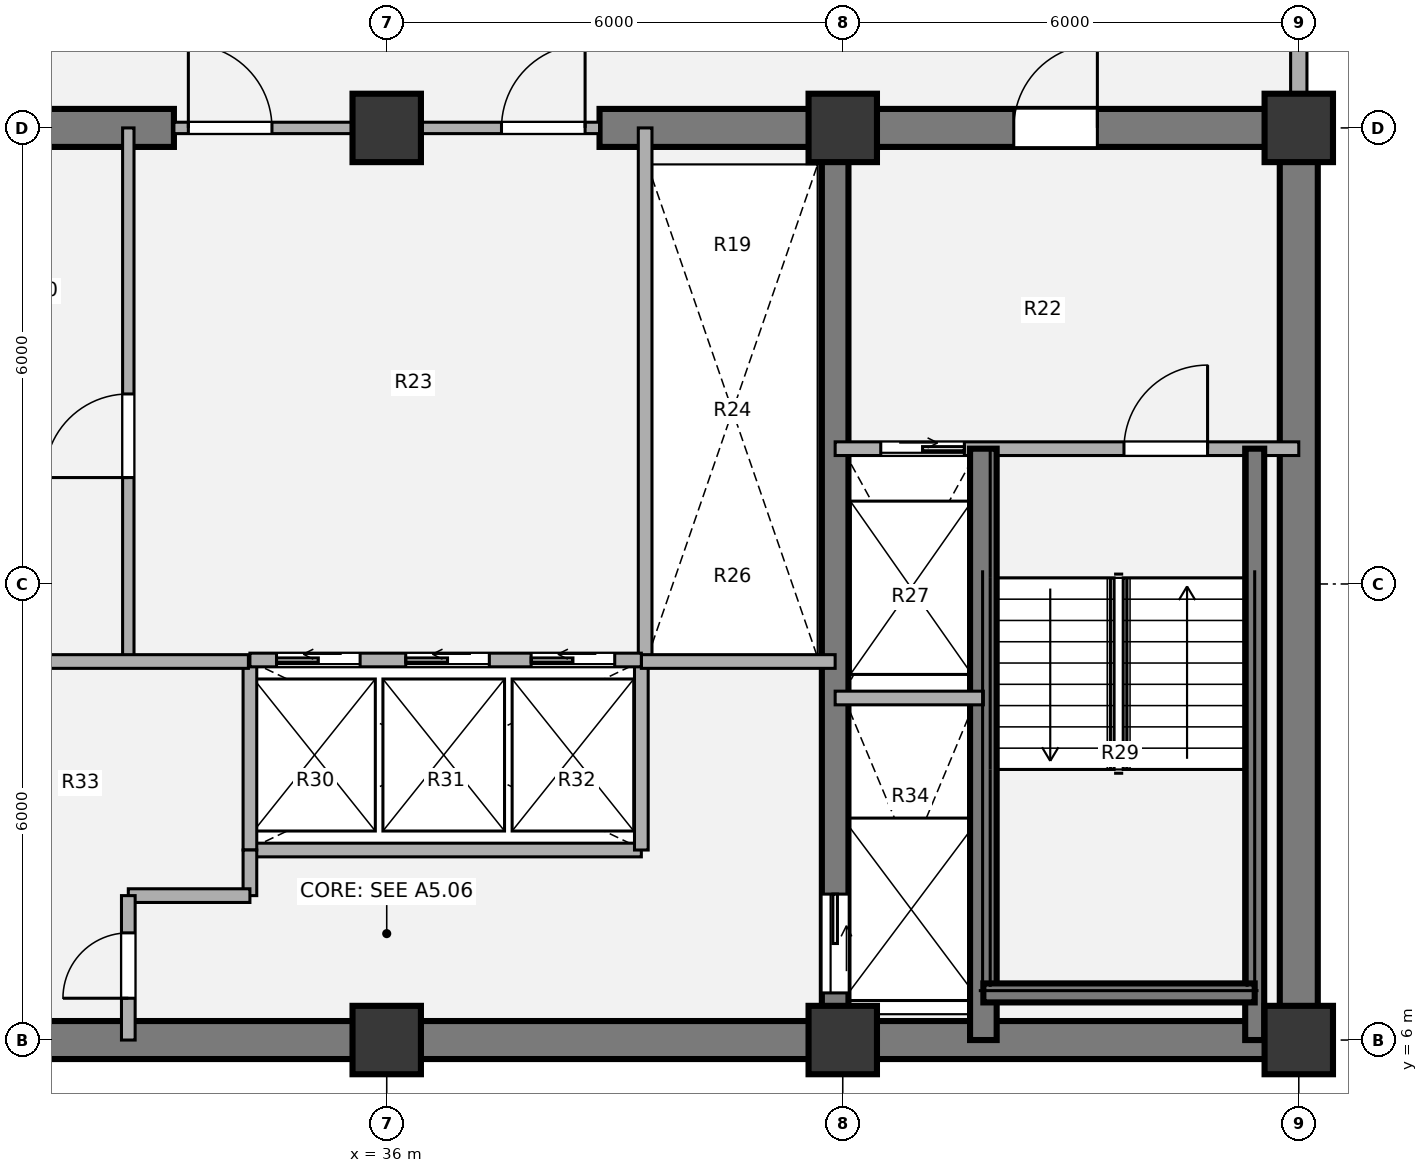
"""IFC4 building model, lengths in metres.
Left out: names, types, materials, properties, quantities, classifications, styles, units other than length and angle.
Written with IfcOpenShell. Run it as: python <this file> out.ifc"""

import sys

from ifc_helpers import new_model, si_unit, direction, frame, frame_2d, origin, origin_2d, place, context, subcontext, project, spatial, rectangle, extrude, source, transform, mapped, element, fill, save


model = new_model("IFC4")
c1 = context("Model", 3, precision=1e-05, world=origin(), true_north=direction((0.0, 1.0)))
c2 = subcontext(c1, "Body", "Model", "MODEL_VIEW")
j1 = project(units=[si_unit("LENGTHUNIT", "METRE"), si_unit("PLANEANGLEUNIT", "RADIAN")], contexts=[c1])
p1 = place(None, origin())
s1 = spatial("IfcSite", under=j1, at=p1, CompositionType="ELEMENT")
p2 = place(p1, origin())
s2 = spatial("IfcBuilding", under=s1, at=p2, CompositionType="ELEMENT")
p3 = place(p2, frame((0.0, 0.0, 104.94)))
s3 = spatial("IfcBuildingStorey", under=s2, at=p3, CompositionType="ELEMENT", Elevation=104.94)
m1 = source(origin(), c2, "Body", "SweptSolid", [
    extrude(rectangle(XDim=0.9, YDim=0.9, at=origin_2d()), origin(), (0.0, 0.0, 1.0), 3.78),
])
for number, where, z_axis, x_axis in (
    (1, (36.0, 6.0, 0.0), (0.0, 0.0, 1.0), (1.0, 0.0, 0.0)),
    (2, (42.0, 6.0, 0.0), (0.0, 0.0, 1.0), (1.0, 0.0, 0.0)),
    (3, (48.0, 6.0, 0.0), (0.0, 0.0, 1.0), (1.0, 0.0, 0.0)),
    (4, (36.0, 18.0, 0.0), (0.0, 0.0, 1.0), (1.0, 0.0, 0.0)),
    (5, (42.0, 18.0, 0.0), (0.0, 0.0, 1.0), (1.0, 0.0, 0.0)),
    (6, (48.0, 18.0, 0.0), (0.0, 0.0, 1.0), (1.0, 0.0, 0.0)),
):
    element("IfcColumn", number, at=place(p3, frame(where, z_axis=z_axis, x_axis=x_axis)), inside=s3, PredefinedType="COLUMN", context=c2, shape_type="MappedRepresentation", body=[
        mapped(m1, transform((0.0, 0.0, 0.0), x_axis=(1.0, 0.0, 0.0), y_axis=(0.0, 1.0, 0.0), z_axis=(0.0, 0.0, 1.0), scale=1.0)),
    ])
p4 = place(p3, frame((48.25, 6.0, 0.0), z_axis=(0.0, 0.0, 1.0), x_axis=(-1.0, 0.0, 0.0)))
e7 = element("IfcWall", 7, at=p4, inside=s3, PredefinedType="SHEAR", context=c2, shape_type="SweptSolid", body=[
    extrude(rectangle(XDim=24.5, YDim=0.5, at=frame_2d((12.25, 0.0))), origin(), (0.0, 0.0, 1.0), 3.78),
])
p5 = place(p3, frame((48.0, 18.0, 0.0), z_axis=(0.0, 0.0, 1.0), x_axis=(0.0, -1.0, 0.0)))
e8 = element("IfcWall", 8, at=p5, inside=s3, PredefinedType="SHEAR", context=c2, shape_type="SweptSolid", body=[
    extrude(rectangle(XDim=12.0, YDim=0.5, at=frame_2d((6.0, 0.0))), origin(), (0.0, 0.0, 1.0), 3.78),
])
p6 = place(p3, frame((23.75, 18.0, 0.0), z_axis=(0.0, 0.0, 1.0), x_axis=(1.0, 0.0, 0.0)))
e9 = element("IfcWall", 9, at=p6, inside=s3, PredefinedType="SHEAR", context=c2, shape_type="SweptSolid", body=[
    extrude(rectangle(XDim=9.45, YDim=0.5, at=frame_2d((4.725, 0.0))), origin(), (0.0, 0.0, 1.0), 3.78),
])
p7 = place(p6, frame((2.95, 0.0, 0.0)))
e10 = element("IfcOpeningElement", 10, at=p7, cuts=e9, PredefinedType="OPENING", context=c2, shape_type="SweptSolid", body=[
    extrude(rectangle(XDim=1.1, YDim=2.1, at=origin_2d()), frame((0.55, 0.26, 1.05), z_axis=(0.0, -1.0, 0.0), x_axis=(1.0, 0.0, 0.0)), (0.0, 0.0, 1.0), 0.52),
])
p8 = place(p3, frame((38.8, 18.0, 0.0), z_axis=(0.0, 0.0, 1.0), x_axis=(1.0, 0.0, 0.0)))
e11 = element("IfcWall", 11, at=p8, inside=s3, PredefinedType="SHEAR", context=c2, shape_type="SweptSolid", body=[
    extrude(rectangle(XDim=9.45, YDim=0.5, at=frame_2d((4.725, 0.0))), origin(), (0.0, 0.0, 1.0), 3.78),
])
p9 = place(p8, frame((5.45, 0.0, 0.0)))
e12 = element("IfcOpeningElement", 12, at=p9, cuts=e11, PredefinedType="OPENING", context=c2, shape_type="SweptSolid", body=[
    extrude(rectangle(XDim=1.1, YDim=2.1, at=origin_2d()), frame((0.55, 0.26, 1.05), z_axis=(0.0, -1.0, 0.0), x_axis=(1.0, 0.0, 0.0)), (0.0, 0.0, 1.0), 0.52),
])
p10 = place(p3, frame((41.9, 18.0, 0.0), z_axis=(0.0, 0.0, 1.0), x_axis=(0.0, -1.0, 0.0)))
e13 = element("IfcWall", 13, at=p10, inside=s3, PredefinedType="SHEAR", context=c2, shape_type="SweptSolid", body=[
    extrude(rectangle(XDim=12.0, YDim=0.35, at=frame_2d((6.0, 0.0))), origin(), (0.0, 0.0, 1.0), 3.78),
])
p11 = place(p10, frame((10.08, 0.0, 0.0)))
e14 = element("IfcOpeningElement", 14, at=p11, cuts=e13, PredefinedType="OPENING", context=c2, shape_type="SweptSolid", body=[
    extrude(rectangle(XDim=1.3, YDim=2.1, at=origin_2d()), frame((0.65, 0.185, 1.05), z_axis=(0.0, -1.0, 0.0), x_axis=(1.0, 0.0, 0.0)), (0.0, 0.0, 1.0), 0.37),
])
p12 = place(p3, frame((48.0, 21.05, 0.0), z_axis=(0.0, 0.0, 1.0), x_axis=(0.0, -1.0, 0.0)))
e15 = element("IfcWall", 15, at=p12, inside=s3, PredefinedType="SOLIDWALL", context=c2, shape_type="SweptSolid", body=[
    extrude(rectangle(XDim=2.62, YDim=0.215, at=frame_2d((1.31, 0.0))), origin(), (0.0, 0.0, 1.0), 3.53),
])
p13 = place(p3, frame((32.6, 11.0, 0.0), z_axis=(0.0, 0.0, 1.0), x_axis=(0.0, 1.0, 0.0)))
e16 = element("IfcWall", 16, at=p13, inside=s3, PredefinedType="PARTITIONING", context=c2, shape_type="SweptSolid", body=[
    extrude(rectangle(XDim=7.0, YDim=0.15, at=frame_2d((3.5, 0.0))), origin(), (0.0, 0.0, 1.0), 3.5),
])
p14 = place(p13, frame((2.4, 0.0, 0.0)))
e17 = element("IfcOpeningElement", 17, at=p14, cuts=e16, PredefinedType="OPENING", context=c2, shape_type="SweptSolid", body=[
    extrude(rectangle(XDim=1.1, YDim=2.1, at=origin_2d()), frame((0.55, 0.085, 1.05), z_axis=(0.0, -1.0, 0.0), x_axis=(1.0, 0.0, 0.0)), (0.0, 0.0, 1.0), 0.17),
])
p15 = place(p3, frame((34.2, 8.5, 0.0), z_axis=(0.0, 0.0, 1.0), x_axis=(1.0, 0.0, 0.0)))
e18 = element("IfcWall", 18, at=p15, inside=s3, PredefinedType="PARTITIONING", context=c2, shape_type="SweptSolid", body=[
    extrude(rectangle(XDim=5.15, YDim=0.18, at=frame_2d((2.575, 0.0))), origin(), (0.0, 0.0, 1.0), 3.5),
])
for number, where, z_axis, x_axis in (
    (19, (34.2, 8.5, 0.0), (0.0, 0.0, 1.0), (0.0, 1.0, 0.0)),
    (20, (39.35, 8.5, 0.0), (0.0, 0.0, 1.0), (0.0, 1.0, 0.0)),
):
    element("IfcWall", number, at=place(p3, frame(where, z_axis=z_axis, x_axis=x_axis)), inside=s3, PredefinedType="PARTITIONING", context=c2, shape_type="SweptSolid", body=[
        extrude(rectangle(XDim=2.5, YDim=0.18, at=frame_2d((1.25, 0.0))), origin(), (0.0, 0.0, 1.0), 3.5),
    ])
p16 = place(p3, frame((39.4, 11.0, 0.0), z_axis=(0.0, 0.0, 1.0), x_axis=(0.0, 1.0, 0.0)))
e21 = element("IfcWall", 21, at=p16, inside=s3, PredefinedType="PARTITIONING", context=c2, shape_type="SweptSolid", body=[
    extrude(rectangle(XDim=7.0, YDim=0.18, at=frame_2d((3.5, 0.0))), origin(), (0.0, 0.0, 1.0), 3.5),
])
p17 = place(p3, frame((30.1, 10.98, 0.0), z_axis=(0.0, 0.0, 1.0), x_axis=(1.0, 0.0, 0.0)))
e22 = element("IfcWall", 22, at=p17, inside=s3, PredefinedType="PARTITIONING", context=c2, shape_type="SweptSolid", body=[
    extrude(rectangle(XDim=4.08, YDim=0.18, at=frame_2d((2.04, 0.0))), origin(), (0.0, 0.0, 1.0), 3.5),
])
p18 = place(p3, frame((34.2, 7.9, 0.0), z_axis=(0.0, 0.0, 1.0), x_axis=(0.0, 1.0, 0.0)))
e23 = element("IfcWall", 23, at=p18, inside=s3, PredefinedType="PARTITIONING", context=c2, shape_type="SweptSolid", body=[
    extrude(rectangle(XDim=0.6, YDim=0.18, at=frame_2d((0.3, 0.0))), origin(), (0.0, 0.0, 1.0), 3.5),
])
p19 = place(p3, frame((32.6, 7.9, 0.0), z_axis=(0.0, 0.0, 1.0), x_axis=(1.0, 0.0, 0.0)))
e24 = element("IfcWall", 24, at=p19, inside=s3, PredefinedType="PARTITIONING", context=c2, shape_type="SweptSolid", body=[
    extrude(rectangle(XDim=1.6, YDim=0.18, at=frame_2d((0.8, 0.0))), origin(), (0.0, 0.0, 1.0), 3.5),
])
p20 = place(p3, frame((32.6, 6.0, 0.0), z_axis=(0.0, 0.0, 1.0), x_axis=(0.0, 1.0, 0.0)))
e25 = element("IfcWall", 25, at=p20, inside=s3, PredefinedType="PARTITIONING", context=c2, shape_type="SweptSolid", body=[
    extrude(rectangle(XDim=1.9, YDim=0.18, at=frame_2d((0.95, 0.0))), origin(), (0.0, 0.0, 1.0), 3.5),
])
p21 = place(p20, frame((0.55, 0.0, 0.0)))
e26 = element("IfcOpeningElement", 26, at=p21, cuts=e25, PredefinedType="OPENING", context=c2, shape_type="SweptSolid", body=[
    extrude(rectangle(XDim=0.86, YDim=2.1, at=origin_2d()), frame((0.43, 0.1, 1.05), z_axis=(0.0, -1.0, 0.0), x_axis=(1.0, 0.0, 0.0)), (0.0, 0.0, 1.0), 0.2),
])
p22 = place(p3, frame((39.35, 10.98, 0.0), z_axis=(0.0, 0.0, 1.0), x_axis=(1.0, 0.0, 0.0)))
e27 = element("IfcWall", 27, at=p22, inside=s3, PredefinedType="PARTITIONING", context=c2, shape_type="SweptSolid", body=[
    extrude(rectangle(XDim=2.55, YDim=0.18, at=frame_2d((1.275, 0.0))), origin(), (0.0, 0.0, 1.0), 3.5),
])
p23 = place(p3, frame((33.2, 18.0, 0.0), z_axis=(0.0, 0.0, 1.0), x_axis=(1.0, 0.0, 0.0)))
e28 = element("IfcWall", 28, at=p23, inside=s3, PredefinedType="PARTITIONING", context=c2, shape_type="SweptSolid", body=[
    extrude(rectangle(XDim=5.6, YDim=0.15, at=frame_2d((2.8, 0.0))), origin(), (0.0, 0.0, 1.0), 2.315),
])
p24 = place(p23, frame((0.19, 0.0, 0.0)))
e29 = element("IfcOpeningElement", 29, at=p24, cuts=e28, PredefinedType="OPENING", context=c2, shape_type="SweptSolid", body=[
    extrude(rectangle(XDim=1.1, YDim=2.1, at=origin_2d()), frame((0.55, 0.085, 1.05), z_axis=(0.0, -1.0, 0.0), x_axis=(1.0, 0.0, 0.0)), (0.0, 0.0, 1.0), 0.17),
])
p25 = place(p23, frame((4.31, 0.0, 0.0)))
e30 = element("IfcOpeningElement", 30, at=p25, cuts=e28, PredefinedType="OPENING", context=c2, shape_type="SweptSolid", body=[
    extrude(rectangle(XDim=1.1, YDim=2.1, at=origin_2d()), frame((0.55, 0.085, 1.05), z_axis=(0.0, -1.0, 0.0), x_axis=(1.0, 0.0, 0.0)), (0.0, 0.0, 1.0), 0.17),
])
p26 = place(p3, frame((41.9, 13.78, 0.0), z_axis=(0.0, 0.0, 1.0), x_axis=(1.0, 0.0, 0.0)))
e31 = element("IfcWall", 31, at=p26, inside=s3, PredefinedType="PARTITIONING", context=c2, shape_type="SweptSolid", body=[
    extrude(rectangle(XDim=6.1, YDim=0.18, at=frame_2d((3.05, 0.0))), origin(), (0.0, 0.0, 1.0), 3.5),
])
p27 = place(p26, frame((0.6, 0.0, 0.0)))
e32 = element("IfcOpeningElement", 32, at=p27, cuts=e31, PredefinedType="OPENING", context=c2, shape_type="SweptSolid", body=[
    extrude(rectangle(XDim=1.1, YDim=2.1, at=origin_2d()), frame((0.55, 0.1, 1.05), z_axis=(0.0, -1.0, 0.0), x_axis=(1.0, 0.0, 0.0)), (0.0, 0.0, 1.0), 0.2),
])
p28 = place(p26, frame((3.8, 0.0, 0.0)))
e33 = element("IfcOpeningElement", 33, at=p28, cuts=e31, PredefinedType="OPENING", context=c2, shape_type="SweptSolid", body=[
    extrude(rectangle(XDim=1.1, YDim=2.1, at=origin_2d()), frame((0.55, 0.1, 1.05), z_axis=(0.0, -1.0, 0.0), x_axis=(1.0, 0.0, 0.0)), (0.0, 0.0, 1.0), 0.2),
])
p29 = place(p3, frame((43.85, 6.0, 0.0), z_axis=(0.0, 0.0, 1.0), x_axis=(0.0, 1.0, 0.0)))
e34 = element("IfcWall", 34, at=p29, inside=s3, PredefinedType="SHEAR", context=c2, shape_type="SweptSolid", body=[
    extrude(rectangle(XDim=7.78, YDim=0.35, at=frame_2d((3.89, 0.0))), origin(), (0.0, 0.0, 1.0), 3.85),
])
p30 = place(p3, frame((47.42, 6.0, 0.0), z_axis=(0.0, 0.0, 1.0), x_axis=(0.0, 1.0, 0.0)))
e35 = element("IfcWall", 35, at=p30, inside=s3, PredefinedType="SHEAR", context=c2, shape_type="SweptSolid", body=[
    extrude(rectangle(XDim=7.78, YDim=0.25, at=frame_2d((3.89, 0.0))), origin(), (0.0, 0.0, 1.0), 3.85),
])
p31 = place(p3, frame((43.85, 6.62, 0.0), z_axis=(0.0, 0.0, 1.0), x_axis=(1.0, 0.0, 0.0)))
e36 = element("IfcWall", 36, at=p31, inside=s3, PredefinedType="SHEAR", context=c2, shape_type="SweptSolid", body=[
    extrude(rectangle(XDim=3.57, YDim=0.25, at=frame_2d((1.785, 0.0))), origin(), (0.0, 0.0, 1.0), 3.85),
])
p32 = place(p3, frame((41.9, 10.5, 0.0), z_axis=(0.0, 0.0, 1.0), x_axis=(1.0, 0.0, 0.0)))
e37 = element("IfcWall", 37, at=p32, inside=s3, PredefinedType="PARTITIONING", context=c2, shape_type="SweptSolid", body=[
    extrude(rectangle(XDim=1.95, YDim=0.18, at=frame_2d((0.975, 0.0))), origin(), (0.0, 0.0, 1.0), 3.5),
])
p33 = place(p3, frame((34.2, 11.0, 0.0), z_axis=(0.0, 0.0, 1.0), x_axis=(1.0, 0.0, 0.0)))
e38 = element("IfcWall", 38, at=p33, inside=s3, PredefinedType="PARTITIONING", context=c2, shape_type="SweptSolid", body=[
    extrude(rectangle(XDim=5.15, YDim=0.18, at=frame_2d((2.575, 0.0))), origin(), (0.0, 0.0, 1.0), 3.5),
])
p34 = place(p33, frame((0.35, 0.0, 0.0)))
e39 = element("IfcOpeningElement", 39, at=p34, cuts=e38, PredefinedType="OPENING", context=c2, shape_type="SweptSolid", body=[
    extrude(rectangle(XDim=1.1, YDim=2.1, at=origin_2d()), frame((0.55, 0.1, 1.05), z_axis=(0.0, -1.0, 0.0), x_axis=(1.0, 0.0, 0.0)), (0.0, 0.0, 1.0), 0.2),
])
p35 = place(p33, frame((2.05, 0.0, 0.0)))
e40 = element("IfcOpeningElement", 40, at=p35, cuts=e38, PredefinedType="OPENING", context=c2, shape_type="SweptSolid", body=[
    extrude(rectangle(XDim=1.1, YDim=2.1, at=origin_2d()), frame((0.55, 0.1, 1.05), z_axis=(0.0, -1.0, 0.0), x_axis=(1.0, 0.0, 0.0)), (0.0, 0.0, 1.0), 0.2),
])
p36 = place(p33, frame((3.7, 0.0, 0.0)))
e41 = element("IfcOpeningElement", 41, at=p36, cuts=e38, PredefinedType="OPENING", context=c2, shape_type="SweptSolid", body=[
    extrude(rectangle(XDim=1.1, YDim=2.1, at=origin_2d()), frame((0.55, 0.1, 1.05), z_axis=(0.0, -1.0, 0.0), x_axis=(1.0, 0.0, 0.0)), (0.0, 0.0, 1.0), 0.2),
])
m2 = source(origin(), c2, "Body", "SweptSolid", [
    extrude(rectangle(XDim=1.1, YDim=2.1, at=origin_2d()), frame((0.55, 0.025, 1.05), z_axis=(0.0, -1.0, 0.0), x_axis=(1.0, 0.0, 0.0)), (0.0, 0.0, 1.0), 0.05),
])
p37 = place(p14, origin())
e42 = element("IfcDoor", 42, at=p37, inside=s3, OperationType="SINGLE_SWING_LEFT", PredefinedType="DOOR", context=c2, shape_type="MappedRepresentation", body=[
    mapped(m2, transform((0.0, 0.0, 0.0), x_axis=(1.0, 0.0, 0.0), y_axis=(0.0, 1.0, 0.0), z_axis=(0.0, 0.0, 1.0), scale=1.0)),
])
fill(e17, e42)
m3 = source(origin(), c2, "Body", "SweptSolid", [
    extrude(rectangle(XDim=0.86, YDim=2.1, at=origin_2d()), frame((0.43, 0.025, 1.05), z_axis=(0.0, -1.0, 0.0), x_axis=(1.0, 0.0, 0.0)), (0.0, 0.0, 1.0), 0.05),
])
p38 = place(p21, origin())
e43 = element("IfcDoor", 43, at=p38, inside=s3, OperationType="SINGLE_SWING_LEFT", PredefinedType="DOOR", context=c2, shape_type="MappedRepresentation", body=[
    mapped(m3, transform((0.0, 0.0, 0.0), x_axis=(1.0, 0.0, 0.0), y_axis=(0.0, 1.0, 0.0), z_axis=(0.0, 0.0, 1.0), scale=1.0)),
])
fill(e26, e43)
m4 = source(origin(), c2, "Body", "SweptSolid", [
    extrude(rectangle(XDim=1.1, YDim=2.1, at=origin_2d()), frame((0.55, 0.025, 1.05), z_axis=(0.0, -1.0, 0.0), x_axis=(1.0, 0.0, 0.0)), (0.0, 0.0, 1.0), 0.05),
])
p39 = place(p24, origin())
e44 = element("IfcDoor", 44, at=p39, inside=s3, OperationType="SINGLE_SWING_LEFT", PredefinedType="DOOR", context=c2, shape_type="MappedRepresentation", body=[
    mapped(m4, transform((0.0, 0.0, 0.0), x_axis=(1.0, 0.0, 0.0), y_axis=(0.0, 1.0, 0.0), z_axis=(0.0, 0.0, 1.0), scale=1.0)),
])
fill(e29, e44)
p40 = place(p25, origin())
e45 = element("IfcDoor", 45, at=p40, inside=s3, OperationType="SINGLE_SWING_RIGHT", PredefinedType="DOOR", context=c2, shape_type="MappedRepresentation", body=[
    mapped(m4, transform((0.0, 0.0, 0.0), x_axis=(1.0, 0.0, 0.0), y_axis=(0.0, 1.0, 0.0), z_axis=(0.0, 0.0, 1.0), scale=1.0)),
])
fill(e30, e45)
m5 = source(origin(), c2, "Body", "SweptSolid", [
    extrude(rectangle(XDim=1.1, YDim=2.1, at=origin_2d()), frame((0.55, 0.025, 1.05), z_axis=(0.0, -1.0, 0.0), x_axis=(1.0, 0.0, 0.0)), (0.0, 0.0, 1.0), 0.05),
])
p41 = place(p27, origin())
e46 = element("IfcDoor", 46, at=p41, inside=s3, OperationType="SLIDING_TO_RIGHT", PredefinedType="DOOR", context=c2, shape_type="MappedRepresentation", body=[
    mapped(m5, transform((0.0, 0.0, 0.0), x_axis=(1.0, 0.0, 0.0), y_axis=(0.0, 1.0, 0.0), z_axis=(0.0, 0.0, 1.0), scale=1.0)),
])
fill(e32, e46)
m6 = source(origin(), c2, "Body", "SweptSolid", [
    extrude(rectangle(XDim=1.1, YDim=2.1, at=origin_2d()), frame((0.55, 0.025, 1.05), z_axis=(0.0, -1.0, 0.0), x_axis=(1.0, 0.0, 0.0)), (0.0, 0.0, 1.0), 0.05),
])
p42 = place(p28, origin())
e47 = element("IfcDoor", 47, at=p42, inside=s3, OperationType="SINGLE_SWING_RIGHT", PredefinedType="DOOR", context=c2, shape_type="MappedRepresentation", body=[
    mapped(m6, transform((0.0, 0.0, 0.0), x_axis=(1.0, 0.0, 0.0), y_axis=(0.0, 1.0, 0.0), z_axis=(0.0, 0.0, 1.0), scale=1.0)),
])
fill(e33, e47)
m7 = source(origin(), c2, "Body", "SweptSolid", [
    extrude(rectangle(XDim=1.3, YDim=2.1, at=origin_2d()), frame((0.65, 0.025, 1.05), z_axis=(0.0, -1.0, 0.0), x_axis=(1.0, 0.0, 0.0)), (0.0, 0.0, 1.0), 0.05),
])
p43 = place(p11, origin())
e48 = element("IfcDoor", 48, at=p43, inside=s3, OperationType="SLIDING_TO_LEFT", PredefinedType="DOOR", context=c2, shape_type="MappedRepresentation", body=[
    mapped(m7, transform((0.0, 0.0, 0.0), x_axis=(1.0, 0.0, 0.0), y_axis=(0.0, 1.0, 0.0), z_axis=(0.0, 0.0, 1.0), scale=1.0)),
])
fill(e14, e48)
p44 = place(p9, origin())
e49 = element("IfcDoor", 49, at=p44, inside=s3, OperationType="SINGLE_SWING_RIGHT", PredefinedType="DOOR", context=c2, shape_type="MappedRepresentation", body=[
    mapped(m4, transform((0.0, 0.0, 0.0), x_axis=(1.0, 0.0, 0.0), y_axis=(0.0, 1.0, 0.0), z_axis=(0.0, 0.0, 1.0), scale=1.0)),
])
fill(e12, e49)
p45 = place(p34, origin())
e50 = element("IfcDoor", 50, at=p45, inside=s3, OperationType="SLIDING_TO_LEFT", PredefinedType="DOOR", context=c2, shape_type="MappedRepresentation", body=[
    mapped(m5, transform((0.0, 0.0, 0.0), x_axis=(1.0, 0.0, 0.0), y_axis=(0.0, 1.0, 0.0), z_axis=(0.0, 0.0, 1.0), scale=1.0)),
])
fill(e39, e50)
p46 = place(p35, origin())
e51 = element("IfcDoor", 51, at=p46, inside=s3, OperationType="SLIDING_TO_LEFT", PredefinedType="DOOR", context=c2, shape_type="MappedRepresentation", body=[
    mapped(m5, transform((0.0, 0.0, 0.0), x_axis=(1.0, 0.0, 0.0), y_axis=(0.0, 1.0, 0.0), z_axis=(0.0, 0.0, 1.0), scale=1.0)),
])
fill(e40, e51)
p47 = place(p36, origin())
e52 = element("IfcDoor", 52, at=p47, inside=s3, OperationType="SLIDING_TO_LEFT", PredefinedType="DOOR", context=c2, shape_type="MappedRepresentation", body=[
    mapped(m5, transform((0.0, 0.0, 0.0), x_axis=(1.0, 0.0, 0.0), y_axis=(0.0, 1.0, 0.0), z_axis=(0.0, 0.0, 1.0), scale=1.0)),
])
fill(e41, e52)
save(model, sys.argv[1])
